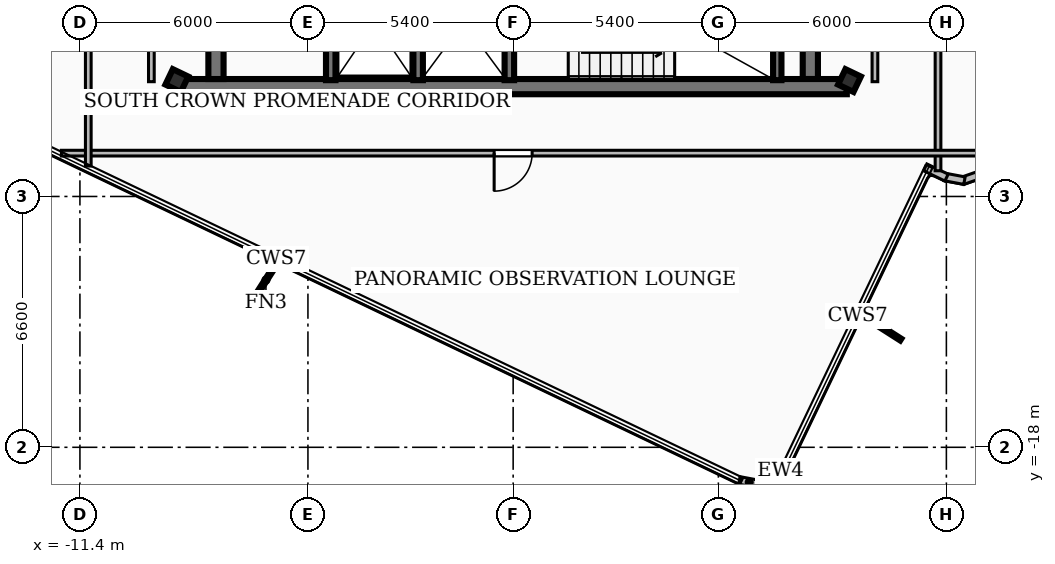
"""IFC4 building model, lengths in metres.
Left out: names, types, materials, properties, quantities, classifications, styles, units other than length and angle.
Written with IfcOpenShell. Run it as: python <this file> out.ifc"""

import sys

from ifc_helpers import new_model, si_unit, direction, frame, frame_2d, origin, origin_2d, place, context, subcontext, project, spatial, rectangle, hollow_rectangle, extrude, element, fill, save


model = new_model("IFC4")
c1 = context("Model", 3, precision=1e-05, world=origin(), true_north=direction((0.0, 1.0)))
c2 = subcontext(c1, "Body", "Model", "MODEL_VIEW")
j1 = project(units=[si_unit("LENGTHUNIT", "METRE"), si_unit("PLANEANGLEUNIT", "RADIAN")], contexts=[c1])
p1 = place(None, origin())
s1 = spatial("IfcSite", under=j1, at=p1, CompositionType="ELEMENT")
p2 = place(p1, origin())
s2 = spatial("IfcBuilding", under=s1, at=p2, CompositionType="ELEMENT")
p3 = place(p2, frame((0.0, 0.0, 293.4)))
s3 = spatial("IfcBuildingStorey", under=s2, at=p3, CompositionType="ELEMENT", Elevation=293.4)
p4 = place(p3, frame((8.78, -8.51, 0.0), z_axis=(0.0, 0.0, 1.0), x_axis=(-1.0, 0.0, 0.0)))
e1 = element("IfcWall", 1, at=p4, inside=s3, PredefinedType="SHEAR", context=c2, shape_type="SweptSolid", body=[
    extrude(rectangle(XDim=17.56, YDim=0.4, at=frame_2d((8.78, 0.0))), origin(), (0.0, 0.0, 1.0), 3.84),
])
for number, where, z_axis, x_axis in (
    (2, (-7.82, -8.31, 0.0), (0.0, 0.0, 1.0), (0.0, 1.0, 0.0)),
    (3, (7.82, -1.95, 0.0), (0.0, 0.0, 1.0), (0.0, -1.0, 0.0)),
):
    element("IfcWall", number, at=place(p3, frame(where, z_axis=z_axis, x_axis=x_axis)), inside=s3, PredefinedType="SHEAR", context=c2, shape_type="SweptSolid", body=[
        extrude(rectangle(XDim=6.36, YDim=0.4, at=frame_2d((3.18, 0.0))), origin(), (0.0, 0.0, 1.0), 3.84),
    ])
p5 = place(p3, frame((6.95, -8.34, 0.0), z_axis=(0.0, 0.0, 1.0), x_axis=(0.0, 1.0, 0.0)))
e4 = element("IfcWall", 4, at=p5, inside=s3, PredefinedType="SOLIDWALL", context=c2, shape_type="SweptSolid", body=[
    extrude(rectangle(XDim=3.06, YDim=0.22, at=frame_2d((1.53, 0.0))), origin(), (0.0, 0.0, 1.0), 3.84),
])
for number, where, z_axis, x_axis in (
    (5, (-0.1, -8.34, 0.0), (0.0, 0.0, 1.0), (0.0, 1.0, 0.0)),
    (6, (-2.5, -8.34, 0.0), (0.0, 0.0, 1.0), (0.0, 1.0, 0.0)),
    (7, (-4.8, -8.34, 0.0), (0.0, 0.0, 1.0), (0.0, 1.0, 0.0)),
):
    element("IfcWall", number, at=place(p3, frame(where, z_axis=z_axis, x_axis=x_axis)), inside=s3, PredefinedType="SOLIDWALL", context=c2, shape_type="SweptSolid", body=[
        extrude(rectangle(XDim=3.04, YDim=0.25, at=frame_2d((1.52, 0.0))), origin(), (0.0, 0.0, 1.0), 3.84),
    ])
for number, where, z_axis, x_axis in (
    (8, (8.85, -8.35, 0.0), (0.0, 0.0, 1.0), (0.431, 0.902, 0.0)),
    (9, (-8.85, -8.35, 0.0), (0.0, 0.0, 1.0), (0.431, 0.902, 0.0)),
):
    element("IfcColumn", number, at=place(p3, frame(where, z_axis=z_axis, x_axis=x_axis)), inside=s3, PredefinedType="COLUMN", context=c2, shape_type="SweptSolid", body=[
        extrude(hollow_rectangle(XDim=0.45, YDim=0.45, WallThickness=0.022, at=origin_2d()), origin(), (0.0, 0.0, 1.0), 4.14),
    ])
p6 = place(p3, frame((7.211, -18.428, 0.0), z_axis=(0.0, 0.0, 1.0), x_axis=(-0.649988656018, -0.759943910462, 0.0)))
e10 = element("IfcWall", 10, at=p6, inside=s3, PredefinedType="SOLIDWALL", context=c2, shape_type="SweptSolid", body=[
    extrude(rectangle(XDim=0.526, YDim=0.2, at=frame_2d((0.263, 0.0))), origin(), (0.0, 0.0, 1.0), 3.84),
])
p7 = place(p3, frame((6.909, -18.801, 0.0), z_axis=(0.0, 0.0, 1.0), x_axis=(-0.943339872384, -0.331828095813, 0.0)))
e11 = element("IfcWall", 11, at=p7, inside=s3, PredefinedType="SOLIDWALL", context=c2, shape_type="SweptSolid", body=[
    extrude(rectangle(XDim=0.515, YDim=0.2, at=frame_2d((0.258, 0.0))), origin(), (0.0, 0.0, 1.0), 3.84),
])
p8 = place(p3, frame((6.472, -18.969, 0.0), z_axis=(0.0, 0.0, 1.0), x_axis=(-0.982736118113, 0.185012762142, 0.0)))
e12 = element("IfcWall", 12, at=p8, inside=s3, PredefinedType="SOLIDWALL", context=c2, shape_type="SweptSolid", body=[
    extrude(rectangle(XDim=0.529, YDim=0.2, at=frame_2d((0.265, 0.0))), origin(), (0.0, 0.0, 1.0), 3.84),
])
p9 = place(p3, frame((12.313, -10.817, 0.0), z_axis=(0.0, 0.0, 1.0), x_axis=(-0.943836182575, -0.3304137716, 0.0)))
e13 = element("IfcWall", 13, at=p9, inside=s3, PredefinedType="SOLIDWALL", context=c2, shape_type="SweptSolid", body=[
    extrude(rectangle(XDim=0.515, YDim=0.2, at=frame_2d((0.257, 0.0))), origin(), (0.0, 0.0, 1.0), 3.84),
])
p10 = place(p3, frame((11.876, -10.984, 0.0), z_axis=(0.0, 0.0, 1.0), x_axis=(-0.983070163766, 0.183229509397, 0.0)))
e14 = element("IfcWall", 14, at=p10, inside=s3, PredefinedType="SOLIDWALL", context=c2, shape_type="SweptSolid", body=[
    extrude(rectangle(XDim=0.529, YDim=0.2, at=frame_2d((0.265, 0.0))), origin(), (0.0, 0.0, 1.0), 3.84),
])
p11 = place(p3, frame((11.404, -10.903, 0.0), z_axis=(0.0, 0.0, 1.0), x_axis=(-0.901682192305, 0.432399380296, 0.0)))
e15 = element("IfcWall", 15, at=p11, inside=s3, PredefinedType="SOLIDWALL", context=c2, shape_type="SweptSolid", body=[
    extrude(rectangle(XDim=0.622, YDim=0.2, at=frame_2d((0.311, 0.0))), origin(), (0.0, 0.0, 1.0), 3.84),
])
p12 = place(p3, frame((-9.52, -8.38, 0.0), z_axis=(0.0, 0.0, 1.0), x_axis=(0.0, 1.0, 0.0)))
e16 = element("IfcWall", 16, at=p12, inside=s3, PredefinedType="PARTITIONING", context=c2, shape_type="SweptSolid", body=[
    extrude(rectangle(XDim=6.63, YDim=0.15, at=frame_2d((3.315, 0.0))), origin(), (0.0, 0.0, 1.0), 3.84),
])
p13 = place(p3, frame((9.52, -8.38, 0.0), z_axis=(0.0, 0.0, 1.0), x_axis=(0.0, 1.0, 0.0)))
e17 = element("IfcWall", 17, at=p13, inside=s3, PredefinedType="PARTITIONING", context=c2, shape_type="SweptSolid", body=[
    extrude(rectangle(XDim=6.63, YDim=0.15, at=frame_2d((3.315, 0.0))), origin(), (0.0, 0.0, 1.0), 3.21),
])
p14 = place(p3, frame((11.18, 10.599, 0.0), z_axis=(0.0, 0.0, 1.0), x_axis=(0.0, -1.0, 0.0)))
e18 = element("IfcWall", 18, at=p14, inside=s3, PredefinedType="PARTITIONING", context=c2, shape_type="SweptSolid", body=[
    extrude(rectangle(XDim=21.322, YDim=0.15, at=frame_2d((10.661, 0.0))), origin(), (0.0, 0.0, 1.0), 3.84),
])
p15 = place(p14, frame((10.099, 0.0, 0.0)))
e19 = element("IfcOpeningElement", 19, at=p15, cuts=e18, PredefinedType="OPENING", context=c2, shape_type="SweptSolid", body=[
    extrude(rectangle(XDim=1.0, YDim=2.1, at=frame_2d((0.5, 1.05))), frame((0.0, 0.085, 0.0), z_axis=(0.0, -1.0, 0.0), x_axis=(1.0, 0.0, 0.0)), (0.0, 0.0, 1.0), 0.17),
])
p16 = place(p3, frame((-11.18, -10.599, 0.0), z_axis=(0.0, 0.0, 1.0), x_axis=(0.0, 1.0, 0.0)))
e20 = element("IfcWall", 20, at=p16, inside=s3, PredefinedType="PARTITIONING", context=c2, shape_type="SweptSolid", body=[
    extrude(rectangle(XDim=21.322, YDim=0.15, at=frame_2d((10.661, 0.0))), origin(), (0.0, 0.0, 1.0), 3.84),
])
p17 = place(p16, frame((8.499, 0.0, 0.0)))
e21 = element("IfcOpeningElement", 21, at=p17, cuts=e20, PredefinedType="OPENING", context=c2, shape_type="SweptSolid", body=[
    extrude(rectangle(XDim=1.0, YDim=2.1, at=frame_2d((0.5, 1.05))), frame((0.0, 0.085, 0.0), z_axis=(0.0, -1.0, 0.0), x_axis=(1.0, 0.0, 0.0)), (0.0, 0.0, 1.0), 0.17),
])
p18 = place(p3, frame((12.624, -10.26, 0.0), z_axis=(0.0, 0.0, 1.0), x_axis=(-1.0, 0.0, 0.0)))
e22 = element("IfcWall", 22, at=p18, inside=s3, PredefinedType="PARTITIONING", context=c2, shape_type="SweptSolid", body=[
    extrude(rectangle(XDim=24.512, YDim=0.15, at=frame_2d((12.256, 0.0))), origin(), (0.0, 0.0, 1.0), 3.21),
])
p19 = place(p18, frame((12.124, 0.0, 0.0)))
e23 = element("IfcOpeningElement", 23, at=p19, cuts=e22, PredefinedType="OPENING", context=c2, shape_type="SweptSolid", body=[
    extrude(rectangle(XDim=1.0, YDim=2.1, at=frame_2d((0.5, 1.05))), frame((0.0, 0.085, 0.0), z_axis=(0.0, -1.0, 0.0), x_axis=(1.0, 0.0, 0.0)), (0.0, 0.0, 1.0), 0.17),
])
p20 = place(p19, origin())
e24 = element("IfcDoor", 24, at=p20, inside=s3, OperationType="SINGLE_SWING_RIGHT", PredefinedType="DOOR", context=c2, shape_type="SweptSolid", body=[
    extrude(rectangle(XDim=1.0, YDim=2.1, at=frame_2d((0.5, 1.05))), frame((0.0, 0.025, 0.0), z_axis=(0.0, -1.0, 0.0), x_axis=(1.0, 0.0, 0.0)), (0.0, 0.0, 1.0), 0.05),
])
fill(e23, e24)
save(model, sys.argv[1])
